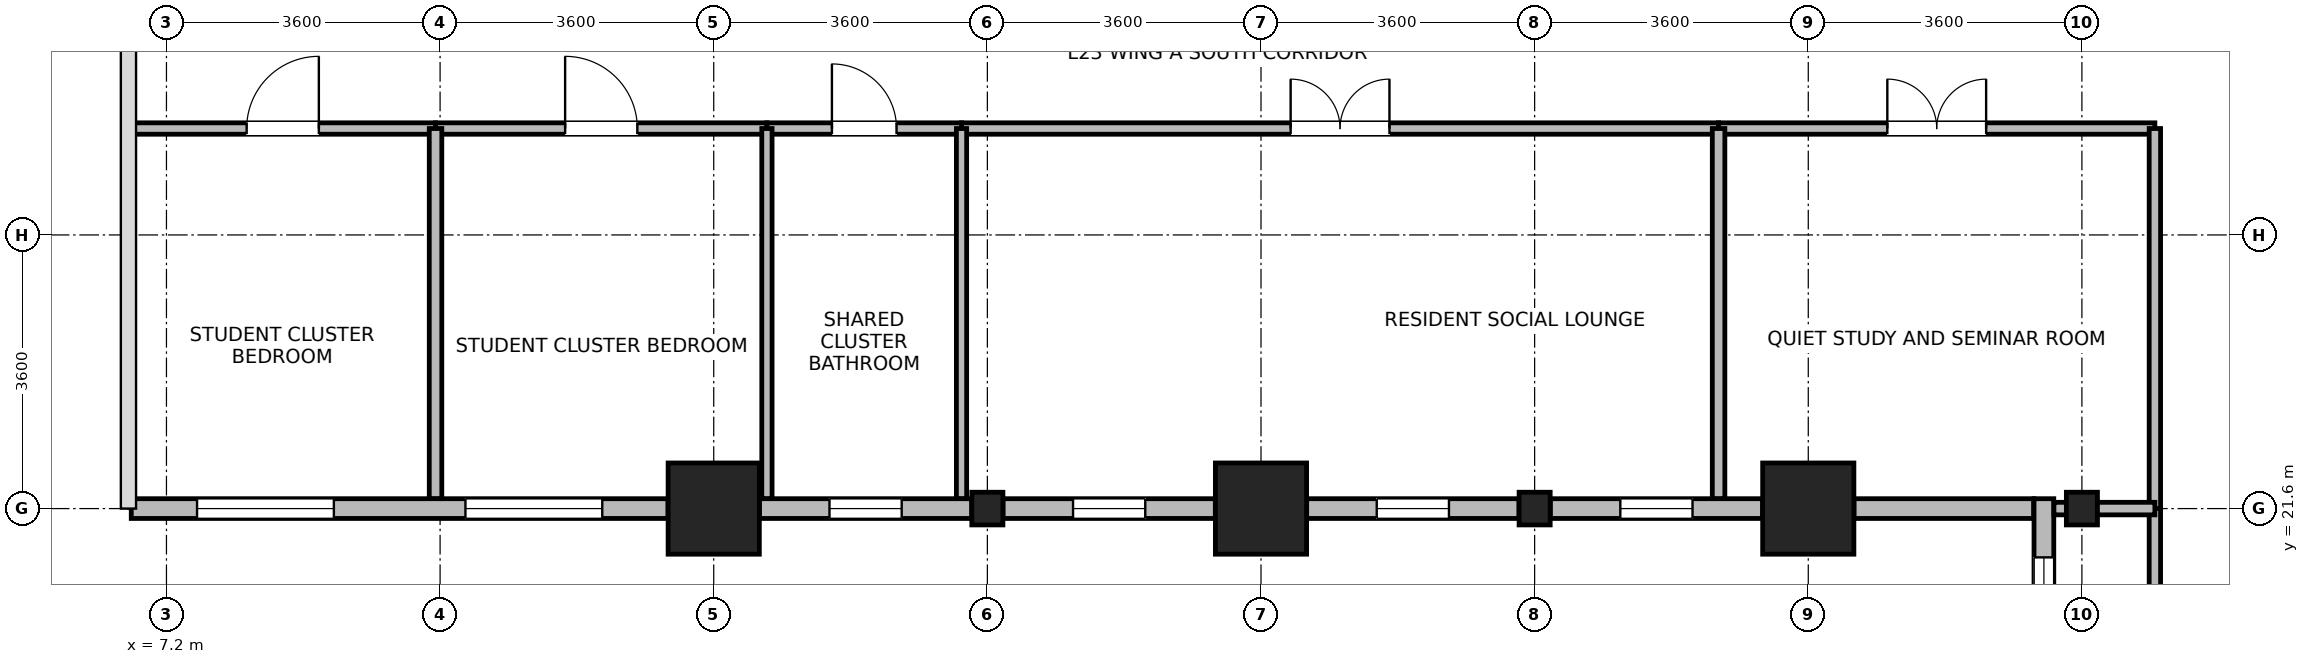
"""IFC4 building model, lengths in metres.
Left out: names, types, materials, properties, quantities, classifications, styles, units other than length and angle.
Written with IfcOpenShell. Run it as: python <this file> out.ifc"""

import sys

from ifc_helpers import new_model, si_unit, direction, frame, frame_2d, origin, origin_2d, place, context, subcontext, project, spatial, rectangle, i_section, extrude, source, transform, mapped, element, fill, save


model = new_model("IFC4")
c1 = context("Model", 3, precision=1e-05, world=origin(), true_north=direction((0.0, 1.0)))
c2 = subcontext(c1, "Body", "Model", "MODEL_VIEW")
j1 = project(units=[si_unit("LENGTHUNIT", "METRE"), si_unit("PLANEANGLEUNIT", "RADIAN")], contexts=[c1])
p1 = place(None, origin())
s1 = spatial("IfcSite", under=j1, at=p1, CompositionType="ELEMENT")
p2 = place(p1, origin())
s2 = spatial("IfcBuilding", under=s1, at=p2, CompositionType="ELEMENT")
p3 = place(p2, frame((0.0, 0.0, 93.4)))
s3 = spatial("IfcBuildingStorey", under=s2, at=p3, CompositionType="ELEMENT", Elevation=93.4)
m1 = source(origin(), c2, "Body", "SweptSolid", [
    extrude(rectangle(XDim=1.2, YDim=1.2, at=origin_2d()), origin(), (0.0, 0.0, 1.0), 3.7),
])
for number, where, z_axis, x_axis in (
    (1, (14.4, 21.6, 0.0), (0.0, 0.0, 1.0), (1.0, 0.0, 0.0)),
    (2, (21.6, 21.6, 0.0), (0.0, 0.0, 1.0), (1.0, 0.0, 0.0)),
    (3, (28.8, 21.6, 0.0), (0.0, 0.0, 1.0), (1.0, 0.0, 0.0)),
):
    element("IfcColumn", number, at=place(p3, frame(where, z_axis=z_axis, x_axis=x_axis)), inside=s3, PredefinedType="COLUMN", context=c2, shape_type="MappedRepresentation", body=[
        mapped(m1, transform((0.0, 0.0, 0.0), x_axis=(1.0, 0.0, 0.0), y_axis=(0.0, 1.0, 0.0), z_axis=(0.0, 0.0, 1.0), scale=1.0)),
    ])
m2 = source(origin(), c2, "Body", "SweptSolid", [
    extrude(i_section(OverallWidth=0.409, OverallDepth=0.43, WebThickness=0.024, FlangeThickness=0.033, FilletRadius=0.015, at=origin_2d()), origin(), (0.0, 0.0, 1.0), 3.7),
])
for number, where, z_axis, x_axis in (
    (4, (18.0, 21.6, 0.0), (0.0, 0.0, 1.0), (1.0, 0.0, 0.0)),
    (5, (25.2, 21.6, 0.0), (0.0, 0.0, 1.0), (1.0, 0.0, 0.0)),
    (6, (32.4, 21.6, 0.0), (0.0, 0.0, 1.0), (1.0, 0.0, 0.0)),
):
    element("IfcColumn", number, at=place(p3, frame(where, z_axis=z_axis, x_axis=x_axis)), inside=s3, PredefinedType="COLUMN", context=c2, shape_type="MappedRepresentation", body=[
        mapped(m2, transform((0.0, 0.0, 0.0), x_axis=(1.0, 0.0, 0.0), y_axis=(0.0, 1.0, 0.0), z_axis=(0.0, 0.0, 1.0), scale=1.0)),
    ])
p4 = place(p3, frame((13.799, 21.6, 0.0), z_axis=(0.0, 0.0, 1.0), x_axis=(-1.0, 0.0, 0.0)))
e7 = element("IfcWall", 7, at=p4, inside=s3, PredefinedType="STANDARD", context=c2, shape_type="SweptSolid", body=[
    extrude(rectangle(XDim=7.062, YDim=0.26, at=frame_2d((3.531, 0.0))), origin(), (0.0, 0.0, 1.0), 3.43),
])
p5 = place(p4, frame((0.865, 0.0, 0.85)))
e8 = element("IfcOpeningElement", 8, at=p5, cuts=e7, PredefinedType="OPENING", context=c2, shape_type="SweptSolid", body=[
    extrude(rectangle(XDim=1.8, YDim=1.85, at=frame_2d((0.9, 0.925))), frame((0.0, 0.14, 0.0), z_axis=(0.0, -1.0, 0.0), x_axis=(1.0, 0.0, 0.0)), (0.0, 0.0, 1.0), 0.28),
])
p6 = place(p4, frame((4.396, 0.0, 0.85)))
e9 = element("IfcOpeningElement", 9, at=p6, cuts=e7, PredefinedType="OPENING", context=c2, shape_type="SweptSolid", body=[
    extrude(rectangle(XDim=1.8, YDim=1.85, at=frame_2d((0.9, 0.925))), frame((0.0, 0.14, 0.0), z_axis=(0.0, -1.0, 0.0), x_axis=(1.0, 0.0, 0.0)), (0.0, 0.0, 1.0), 0.28),
])
p7 = place(p3, frame((17.794, 21.6, 0.0), z_axis=(0.0, 0.0, 1.0), x_axis=(-1.0, 0.0, 0.0)))
e10 = element("IfcWall", 10, at=p7, inside=s3, PredefinedType="STANDARD", context=c2, shape_type="SweptSolid", body=[
    extrude(rectangle(XDim=2.793, YDim=0.26, at=frame_2d((1.397, 0.0))), origin(), (0.0, 0.0, 1.0), 2.93),
])
p8 = place(p7, frame((0.922, 0.0, 0.85)))
e11 = element("IfcOpeningElement", 11, at=p8, cuts=e10, PredefinedType="OPENING", context=c2, shape_type="SweptSolid", body=[
    extrude(rectangle(XDim=0.95, YDim=1.75, at=frame_2d((0.475, 0.875))), frame((0.0, 0.14, 0.0), z_axis=(0.0, -1.0, 0.0), x_axis=(1.0, 0.0, 0.0)), (0.0, 0.0, 1.0), 0.28),
])
p9 = place(p3, frame((20.999, 21.6, 0.0), z_axis=(0.0, 0.0, 1.0), x_axis=(-1.0, 0.0, 0.0)))
e12 = element("IfcWall", 12, at=p9, inside=s3, PredefinedType="STANDARD", context=c2, shape_type="SweptSolid", body=[
    extrude(rectangle(XDim=2.793, YDim=0.26, at=frame_2d((1.397, 0.0))), origin(), (0.0, 0.0, 1.0), 2.93),
])
p10 = place(p9, frame((0.922, 0.0, 0.85)))
e13 = element("IfcOpeningElement", 13, at=p10, cuts=e12, PredefinedType="OPENING", context=c2, shape_type="SweptSolid", body=[
    extrude(rectangle(XDim=0.95, YDim=1.75, at=frame_2d((0.475, 0.875))), frame((0.0, 0.14, 0.0), z_axis=(0.0, -1.0, 0.0), x_axis=(1.0, 0.0, 0.0)), (0.0, 0.0, 1.0), 0.28),
])
p11 = place(p3, frame((24.994, 21.6, 0.0), z_axis=(0.0, 0.0, 1.0), x_axis=(-1.0, 0.0, 0.0)))
e14 = element("IfcWall", 14, at=p11, inside=s3, PredefinedType="STANDARD", context=c2, shape_type="SweptSolid", body=[
    extrude(rectangle(XDim=2.793, YDim=0.26, at=frame_2d((1.397, 0.0))), origin(), (0.0, 0.0, 1.0), 2.93),
])
p12 = place(p11, frame((0.922, 0.0, 0.85)))
e15 = element("IfcOpeningElement", 15, at=p12, cuts=e14, PredefinedType="OPENING", context=c2, shape_type="SweptSolid", body=[
    extrude(rectangle(XDim=0.95, YDim=1.75, at=frame_2d((0.475, 0.875))), frame((0.0, 0.14, 0.0), z_axis=(0.0, -1.0, 0.0), x_axis=(1.0, 0.0, 0.0)), (0.0, 0.0, 1.0), 0.28),
])
p13 = place(p3, frame((28.199, 21.6, 0.0), z_axis=(0.0, 0.0, 1.0), x_axis=(-1.0, 0.0, 0.0)))
e16 = element("IfcWall", 16, at=p13, inside=s3, PredefinedType="STANDARD", context=c2, shape_type="SweptSolid", body=[
    extrude(rectangle(XDim=2.793, YDim=0.26, at=frame_2d((1.397, 0.0))), origin(), (0.0, 0.0, 1.0), 2.93),
])
p14 = place(p13, frame((0.922, 0.0, 0.85)))
e17 = element("IfcOpeningElement", 17, at=p14, cuts=e16, PredefinedType="OPENING", context=c2, shape_type="SweptSolid", body=[
    extrude(rectangle(XDim=0.95, YDim=1.75, at=frame_2d((0.475, 0.875))), frame((0.0, 0.14, 0.0), z_axis=(0.0, -1.0, 0.0), x_axis=(1.0, 0.0, 0.0)), (0.0, 0.0, 1.0), 0.28),
])
p15 = place(p3, frame((31.765, 21.6, 0.0), z_axis=(0.0, 0.0, 1.0), x_axis=(-1.0, 0.0, 0.0)))
e18 = element("IfcWall", 18, at=p15, inside=s3, PredefinedType="STANDARD", context=c2, shape_type="SweptSolid", body=[
    extrude(rectangle(XDim=2.364, YDim=0.26, at=frame_2d((1.182, 0.0))), origin(), (0.0, 0.0, 1.0), 2.93),
])
p16 = place(p3, frame((31.9, 1.67, 0.0), z_axis=(0.0, 0.0, 1.0), x_axis=(0.0, 1.0, 0.0)))
e19 = element("IfcWall", 19, at=p16, inside=s3, PredefinedType="STANDARD", context=c2, shape_type="SweptSolid", body=[
    extrude(rectangle(XDim=20.06, YDim=0.26, at=frame_2d((10.03, 0.0))), origin(), (0.0, 0.0, 1.0), 3.43),
])
p17 = place(p16, frame((0.772, 0.0, 0.85)))
e20 = element("IfcOpeningElement", 20, at=p17, cuts=e19, PredefinedType="OPENING", context=c2, shape_type="SweptSolid", body=[
    extrude(rectangle(XDim=1.8, YDim=1.85, at=frame_2d((0.9, 0.925))), frame((0.0, 0.14, 0.0), z_axis=(0.0, -1.0, 0.0), x_axis=(1.0, 0.0, 0.0)), (0.0, 0.0, 1.0), 0.28),
])
p18 = place(p16, frame((7.458, 0.0, 0.85)))
e21 = element("IfcOpeningElement", 21, at=p18, cuts=e19, PredefinedType="OPENING", context=c2, shape_type="SweptSolid", body=[
    extrude(rectangle(XDim=1.8, YDim=1.85, at=frame_2d((0.9, 0.925))), frame((0.0, 0.14, 0.0), z_axis=(0.0, -1.0, 0.0), x_axis=(1.0, 0.0, 0.0)), (0.0, 0.0, 1.0), 0.28),
])
p19 = place(p16, frame((14.145, 0.0, 0.85)))
e22 = element("IfcOpeningElement", 22, at=p19, cuts=e19, PredefinedType="OPENING", context=c2, shape_type="SweptSolid", body=[
    extrude(rectangle(XDim=1.8, YDim=1.85, at=frame_2d((0.9, 0.925))), frame((0.0, 0.14, 0.0), z_axis=(0.0, -1.0, 0.0), x_axis=(1.0, 0.0, 0.0)), (0.0, 0.0, 1.0), 0.28),
])
p20 = place(p16, frame((17.488, 0.0, 0.85)))
e23 = element("IfcOpeningElement", 23, at=p20, cuts=e19, PredefinedType="OPENING", context=c2, shape_type="SweptSolid", body=[
    extrude(rectangle(XDim=1.8, YDim=1.85, at=frame_2d((0.9, 0.925))), frame((0.0, 0.14, 0.0), z_axis=(0.0, -1.0, 0.0), x_axis=(1.0, 0.0, 0.0)), (0.0, 0.0, 1.0), 0.28),
])
p21 = place(p3, frame((17.66, 26.6, 0.0), z_axis=(0.0, 0.0, 1.0), x_axis=(1.0, 0.0, 0.0)))
e24 = element("IfcWall", 24, at=p21, inside=s3, PredefinedType="PARTITIONING", context=c2, shape_type="SweptSolid", body=[
    extrude(rectangle(XDim=9.96, YDim=0.15, at=frame_2d((4.98, 0.0))), origin(), (0.0, 0.0, 1.0), 3.43),
])
p22 = place(p21, frame((4.33, 0.0, 0.0)))
e25 = element("IfcOpeningElement", 25, at=p22, cuts=e24, PredefinedType="OPENING", context=c2, shape_type="SweptSolid", body=[
    extrude(rectangle(XDim=1.3, YDim=2.12, at=frame_2d((0.65, 1.06))), frame((0.0, 0.085, 0.0), z_axis=(0.0, -1.0, 0.0), x_axis=(1.0, 0.0, 0.0)), (0.0, 0.0, 1.0), 0.17),
])
p23 = place(p3, frame((33.36, 14.5, 0.0), z_axis=(0.0, 0.0, 1.0), x_axis=(0.0, 1.0, 0.0)))
e26 = element("IfcWall", 26, at=p23, inside=s3, PredefinedType="PARTITIONING", context=c2, shape_type="SweptSolid", body=[
    extrude(rectangle(XDim=7.1, YDim=0.15, at=frame_2d((3.55, 0.0))), origin(), (0.0, 0.0, 1.0), 3.43),
])
p24 = place(p23, frame((2.9, 0.0, 0.0)))
e27 = element("IfcOpeningElement", 27, at=p24, cuts=e26, PredefinedType="OPENING", context=c2, shape_type="SweptSolid", body=[
    extrude(rectangle(XDim=1.3, YDim=2.12, at=frame_2d((0.65, 1.06))), frame((0.0, 0.085, 0.0), z_axis=(0.0, -1.0, 0.0), x_axis=(1.0, 0.0, 0.0)), (0.0, 0.0, 1.0), 0.17),
])
p25 = place(p3, frame((27.62, 26.6, 0.0), z_axis=(0.0, 0.0, 1.0), x_axis=(1.0, 0.0, 0.0)))
e28 = element("IfcWall", 28, at=p25, inside=s3, PredefinedType="PARTITIONING", context=c2, shape_type="SweptSolid", body=[
    extrude(rectangle(XDim=5.74, YDim=0.15, at=frame_2d((2.87, 0.0))), origin(), (0.0, 0.0, 1.0), 3.43),
])
p26 = place(p25, frame((2.22, 0.0, 0.0)))
e29 = element("IfcOpeningElement", 29, at=p26, cuts=e28, PredefinedType="OPENING", context=c2, shape_type="SweptSolid", body=[
    extrude(rectangle(XDim=1.3, YDim=2.12, at=frame_2d((0.65, 1.06))), frame((0.0, 0.085, 0.0), z_axis=(0.0, -1.0, 0.0), x_axis=(1.0, 0.0, 0.0)), (0.0, 0.0, 1.0), 0.17),
])
p27 = place(p3, frame((33.36, 21.6, 0.0), z_axis=(0.0, 0.0, 1.0), x_axis=(0.0, 1.0, 0.0)))
e30 = element("IfcWall", 30, at=p27, inside=s3, PredefinedType="PARTITIONING", context=c2, shape_type="SweptSolid", body=[
    extrude(rectangle(XDim=5.0, YDim=0.15, at=frame_2d((2.5, 0.0))), origin(), (0.0, 0.0, 1.0), 3.43),
])
p28 = place(p3, frame((10.74, 26.6, 0.0), z_axis=(0.0, 0.0, 1.0), x_axis=(1.0, 0.0, 0.0)))
e31 = element("IfcWall", 31, at=p28, inside=s3, PredefinedType="PARTITIONING", context=c2, shape_type="SweptSolid", body=[
    extrude(rectangle(XDim=4.36, YDim=0.15, at=frame_2d((2.18, 0.0))), origin(), (0.0, 0.0, 1.0), 3.43),
])
p29 = place(p28, frame((1.705, 0.0, 0.0)))
e32 = element("IfcOpeningElement", 32, at=p29, cuts=e31, PredefinedType="OPENING", context=c2, shape_type="SweptSolid", body=[
    extrude(rectangle(XDim=0.95, YDim=2.1, at=frame_2d((0.475, 1.05))), frame((0.0, 0.085, 0.0), z_axis=(0.0, -1.0, 0.0), x_axis=(1.0, 0.0, 0.0)), (0.0, 0.0, 1.0), 0.17),
])
p30 = place(p3, frame((6.72, 26.6, 0.0), z_axis=(0.0, 0.0, 1.0), x_axis=(1.0, 0.0, 0.0)))
e33 = element("IfcWall", 33, at=p30, inside=s3, PredefinedType="PARTITIONING", context=c2, shape_type="SweptSolid", body=[
    extrude(rectangle(XDim=4.02, YDim=0.15, at=frame_2d((2.01, 0.0))), origin(), (0.0, 0.0, 1.0), 3.43),
])
p31 = place(p30, frame((1.535, 0.0, 0.0)))
e34 = element("IfcOpeningElement", 34, at=p31, cuts=e33, PredefinedType="OPENING", context=c2, shape_type="SweptSolid", body=[
    extrude(rectangle(XDim=0.95, YDim=2.1, at=frame_2d((0.475, 1.05))), frame((0.0, 0.085, 0.0), z_axis=(0.0, -1.0, 0.0), x_axis=(1.0, 0.0, 0.0)), (0.0, 0.0, 1.0), 0.17),
])
p32 = place(p3, frame((15.1, 26.6, 0.0), z_axis=(0.0, 0.0, 1.0), x_axis=(1.0, 0.0, 0.0)))
e35 = element("IfcWall", 35, at=p32, inside=s3, PredefinedType="PARTITIONING", context=c2, shape_type="SweptSolid", body=[
    extrude(rectangle(XDim=2.56, YDim=0.15, at=frame_2d((1.28, 0.0))), origin(), (0.0, 0.0, 1.0), 3.43),
])
p33 = place(p32, frame((0.855, 0.0, 0.0)))
e36 = element("IfcOpeningElement", 36, at=p33, cuts=e35, PredefinedType="OPENING", context=c2, shape_type="SweptSolid", body=[
    extrude(rectangle(XDim=0.85, YDim=2.04, at=frame_2d((0.425, 1.02))), frame((0.0, 0.085, 0.0), z_axis=(0.0, -1.0, 0.0), x_axis=(1.0, 0.0, 0.0)), (0.0, 0.0, 1.0), 0.17),
])
p34 = place(p3, frame((10.74, 21.732, 0.0), z_axis=(0.0, 0.0, 1.0), x_axis=(0.0, 1.0, 0.0)))
e37 = element("IfcWall", 37, at=p34, inside=s3, PredefinedType="PARTITIONING", context=c2, shape_type="SweptSolid", body=[
    extrude(rectangle(XDim=4.868, YDim=0.165, at=frame_2d((2.434, 0.0))), origin(), (0.0, 0.0, 1.0), 3.43),
])
for number, where, z_axis, x_axis in (
    (38, (15.1, 21.732, 0.0), (0.0, 0.0, 1.0), (0.0, 1.0, 0.0)),
    (39, (17.66, 21.732, 0.0), (0.0, 0.0, 1.0), (0.0, 1.0, 0.0)),
):
    element("IfcWall", number, at=place(p3, frame(where, z_axis=z_axis, x_axis=x_axis)), inside=s3, PredefinedType="PARTITIONING", context=c2, shape_type="SweptSolid", body=[
        extrude(rectangle(XDim=4.868, YDim=0.135, at=frame_2d((2.434, 0.0))), origin(), (0.0, 0.0, 1.0), 3.43),
    ])
p35 = place(p3, frame((27.62, 21.732, 0.0), z_axis=(0.0, 0.0, 1.0), x_axis=(0.0, 1.0, 0.0)))
e40 = element("IfcWall", 40, at=p35, inside=s3, PredefinedType="PARTITIONING", context=c2, shape_type="SweptSolid", body=[
    extrude(rectangle(XDim=4.868, YDim=0.165, at=frame_2d((2.434, 0.0))), origin(), (0.0, 0.0, 1.0), 3.43),
])
p36 = place(p3, frame((32.032, 21.6, 0.0), z_axis=(0.0, 0.0, 1.0), x_axis=(1.0, 0.0, 0.0)))
e41 = element("IfcWall", 41, at=p36, inside=s3, PredefinedType="PARTITIONING", context=c2, shape_type="SweptSolid", body=[
    extrude(rectangle(XDim=1.328, YDim=0.165, at=frame_2d((0.664, 0.0))), origin(), (0.0, 0.0, 1.0), 2.93),
])
p37 = place(p5, origin())
e42 = element("IfcWindow", 42, at=p37, inside=s3, PartitioningType="SINGLE_PANEL", PredefinedType="WINDOW", context=c2, shape_type="SweptSolid", body=[
    extrude(rectangle(XDim=1.8, YDim=1.85, at=frame_2d((0.9, 0.925))), frame((0.0, 0.03, 0.0), z_axis=(0.0, -1.0, 0.0), x_axis=(1.0, 0.0, 0.0)), (0.0, 0.0, 1.0), 0.06),
])
fill(e8, e42)
p38 = place(p6, origin())
e43 = element("IfcWindow", 43, at=p38, inside=s3, PartitioningType="SINGLE_PANEL", PredefinedType="WINDOW", context=c2, shape_type="SweptSolid", body=[
    extrude(rectangle(XDim=1.8, YDim=1.85, at=frame_2d((0.9, 0.925))), frame((0.0, 0.03, 0.0), z_axis=(0.0, -1.0, 0.0), x_axis=(1.0, 0.0, 0.0)), (0.0, 0.0, 1.0), 0.06),
])
fill(e9, e43)
p39 = place(p8, origin())
e44 = element("IfcWindow", 44, at=p39, inside=s3, PartitioningType="SINGLE_PANEL", PredefinedType="WINDOW", context=c2, shape_type="SweptSolid", body=[
    extrude(rectangle(XDim=0.95, YDim=1.75, at=frame_2d((0.475, 0.875))), frame((0.0, 0.03, 0.0), z_axis=(0.0, -1.0, 0.0), x_axis=(1.0, 0.0, 0.0)), (0.0, 0.0, 1.0), 0.06),
])
fill(e11, e44)
p40 = place(p10, origin())
e45 = element("IfcWindow", 45, at=p40, inside=s3, PartitioningType="SINGLE_PANEL", PredefinedType="WINDOW", context=c2, shape_type="SweptSolid", body=[
    extrude(rectangle(XDim=0.95, YDim=1.75, at=frame_2d((0.475, 0.875))), frame((0.0, 0.03, 0.0), z_axis=(0.0, -1.0, 0.0), x_axis=(1.0, 0.0, 0.0)), (0.0, 0.0, 1.0), 0.06),
])
fill(e13, e45)
p41 = place(p12, origin())
e46 = element("IfcWindow", 46, at=p41, inside=s3, PartitioningType="SINGLE_PANEL", PredefinedType="WINDOW", context=c2, shape_type="SweptSolid", body=[
    extrude(rectangle(XDim=0.95, YDim=1.75, at=frame_2d((0.475, 0.875))), frame((0.0, 0.03, 0.0), z_axis=(0.0, -1.0, 0.0), x_axis=(1.0, 0.0, 0.0)), (0.0, 0.0, 1.0), 0.06),
])
fill(e15, e46)
p42 = place(p14, origin())
e47 = element("IfcWindow", 47, at=p42, inside=s3, PartitioningType="SINGLE_PANEL", PredefinedType="WINDOW", context=c2, shape_type="SweptSolid", body=[
    extrude(rectangle(XDim=0.95, YDim=1.75, at=frame_2d((0.475, 0.875))), frame((0.0, 0.03, 0.0), z_axis=(0.0, -1.0, 0.0), x_axis=(1.0, 0.0, 0.0)), (0.0, 0.0, 1.0), 0.06),
])
fill(e17, e47)
p43 = place(p20, origin())
e48 = element("IfcWindow", 48, at=p43, inside=s3, PartitioningType="SINGLE_PANEL", PredefinedType="WINDOW", context=c2, shape_type="SweptSolid", body=[
    extrude(rectangle(XDim=1.8, YDim=1.85, at=frame_2d((0.9, 0.925))), frame((0.0, 0.03, 0.0), z_axis=(0.0, -1.0, 0.0), x_axis=(1.0, 0.0, 0.0)), (0.0, 0.0, 1.0), 0.06),
])
fill(e23, e48)
p44 = place(p22, origin())
e49 = element("IfcDoor", 49, at=p44, inside=s3, OperationType="DOUBLE_DOOR_SINGLE_SWING", PredefinedType="DOOR", context=c2, shape_type="SweptSolid", body=[
    extrude(rectangle(XDim=1.3, YDim=2.12, at=frame_2d((0.65, 1.06))), frame((0.0, 0.025, 0.0), z_axis=(0.0, -1.0, 0.0), x_axis=(1.0, 0.0, 0.0)), (0.0, 0.0, 1.0), 0.05),
])
fill(e25, e49)
p45 = place(p26, origin())
e50 = element("IfcDoor", 50, at=p45, inside=s3, OperationType="DOUBLE_DOOR_SINGLE_SWING", PredefinedType="DOOR", context=c2, shape_type="SweptSolid", body=[
    extrude(rectangle(XDim=1.3, YDim=2.12, at=frame_2d((0.65, 1.06))), frame((0.0, 0.025, 0.0), z_axis=(0.0, -1.0, 0.0), x_axis=(1.0, 0.0, 0.0)), (0.0, 0.0, 1.0), 0.05),
])
fill(e29, e50)
p46 = place(p29, origin())
e51 = element("IfcDoor", 51, at=p46, inside=s3, OperationType="SINGLE_SWING_LEFT", PredefinedType="DOOR", context=c2, shape_type="SweptSolid", body=[
    extrude(rectangle(XDim=0.95, YDim=2.1, at=frame_2d((0.475, 1.05))), frame((0.0, 0.025, 0.0), z_axis=(0.0, -1.0, 0.0), x_axis=(1.0, 0.0, 0.0)), (0.0, 0.0, 1.0), 0.05),
])
fill(e32, e51)
p47 = place(p31, origin())
e52 = element("IfcDoor", 52, at=p47, inside=s3, OperationType="SINGLE_SWING_RIGHT", PredefinedType="DOOR", context=c2, shape_type="SweptSolid", body=[
    extrude(rectangle(XDim=0.95, YDim=2.1, at=frame_2d((0.475, 1.05))), frame((0.0, 0.025, 0.0), z_axis=(0.0, -1.0, 0.0), x_axis=(1.0, 0.0, 0.0)), (0.0, 0.0, 1.0), 0.05),
])
fill(e34, e52)
p48 = place(p33, origin())
e53 = element("IfcDoor", 53, at=p48, inside=s3, OperationType="SINGLE_SWING_LEFT", PredefinedType="DOOR", context=c2, shape_type="SweptSolid", body=[
    extrude(rectangle(XDim=0.85, YDim=2.04, at=frame_2d((0.425, 1.02))), frame((0.0, 0.025, 0.0), z_axis=(0.0, -1.0, 0.0), x_axis=(1.0, 0.0, 0.0)), (0.0, 0.0, 1.0), 0.05),
])
fill(e36, e53)
save(model, sys.argv[1])
